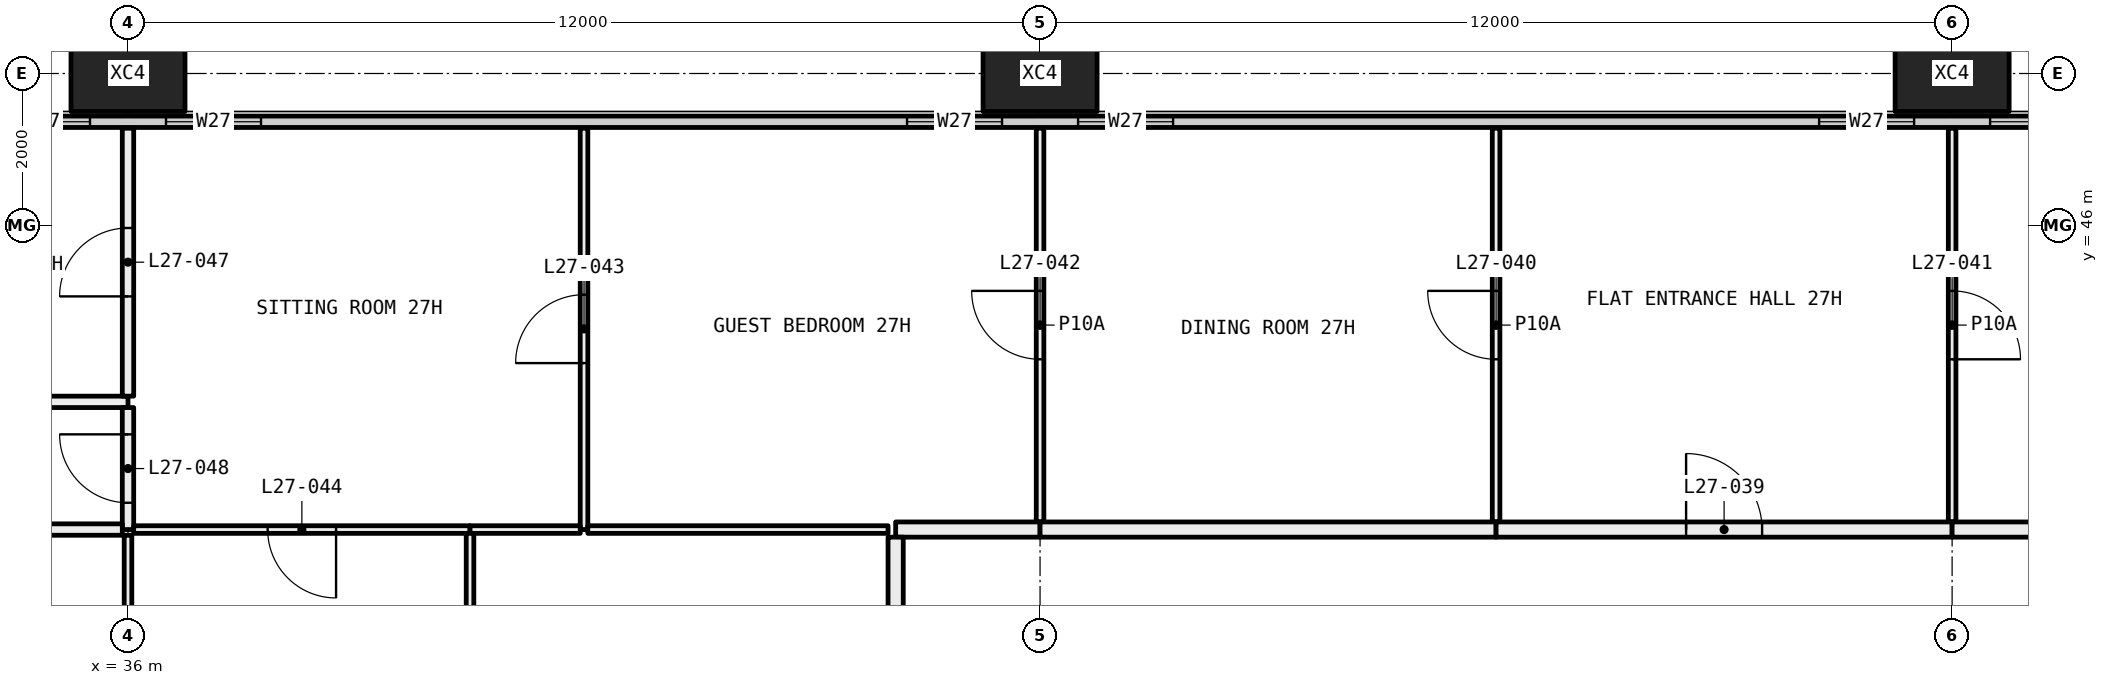
"""IFC4 building model, lengths in metres.
Left out: names, types, materials, properties, quantities, classifications, styles, units other than length and angle.
Written with IfcOpenShell. Run it as: python <this file> out.ifc"""

import sys

from ifc_helpers import new_model, si_unit, direction, frame, frame_2d, origin, origin_2d, place, context, subcontext, project, spatial, rectangle, hollow_rectangle, extrude, element, fill, save


model = new_model("IFC4")
c1 = context("Model", 3, precision=1e-05, world=origin(), true_north=direction((0.0, 1.0)))
c2 = subcontext(c1, "Body", "Model", "MODEL_VIEW")
j1 = project(units=[si_unit("LENGTHUNIT", "METRE"), si_unit("PLANEANGLEUNIT", "RADIAN")], contexts=[c1])
p1 = place(None, origin())
s1 = spatial("IfcSite", under=j1, at=p1, CompositionType="ELEMENT")
p2 = place(p1, origin())
s2 = spatial("IfcBuilding", under=s1, at=p2, CompositionType="ELEMENT")
p3 = place(p2, frame((0.0, 0.0, 106.95)))
s3 = spatial("IfcBuildingStorey", under=s2, at=p3, CompositionType="ELEMENT", Elevation=106.95)
for number, where, z_axis, x_axis in (
    (1, (36.0, 48.0, -0.4), (0.0, 0.0, 1.0), (1.0, 0.0, 0.0)),
    (2, (48.0, 48.0, -0.4), (0.0, 0.0, 1.0), (1.0, 0.0, 0.0)),
    (3, (60.0, 48.0, -0.4), (0.0, 0.0, 1.0), (1.0, 0.0, 0.0)),
):
    element("IfcColumn", number, at=place(p3, frame(where, z_axis=z_axis, x_axis=x_axis)), inside=s3, PredefinedType="COLUMN", context=c2, shape_type="SweptSolid", body=[
        extrude(hollow_rectangle(XDim=1.5, YDim=1.0, WallThickness=0.06, at=origin_2d()), origin(), (0.0, 0.0, 1.0), 3.45),
    ])
p4 = place(p3, frame((6.56, 47.365, 0.0), z_axis=(0.0, 0.0, 1.0), x_axis=(1.0, 0.0, 0.0)))
e4 = element("IfcWall", 4, at=p4, inside=s3, PredefinedType="ELEMENTEDWALL", context=c2, shape_type="SweptSolid", body=[
    extrude(rectangle(XDim=58.88, YDim=0.15, at=frame_2d((29.44, 0.0))), origin(), (0.0, 0.0, 1.0), 3.05),
])
p5 = place(p4, frame((0.44, 0.0, 0.45)))
e5 = element("IfcOpeningElement", 5, at=p5, cuts=e4, PredefinedType="OPENING", context=c2, shape_type="SweptSolid", body=[
    extrude(rectangle(XDim=4.5, YDim=2.55, at=frame_2d((2.25, 1.275))), frame((0.0, 0.085, 0.0), z_axis=(0.0, -1.0, 0.0), x_axis=(1.0, 0.0, 0.0)), (0.0, 0.0, 1.0), 0.17),
])
p6 = place(p4, frame((5.94, 0.0, 0.45)))
e6 = element("IfcOpeningElement", 6, at=p6, cuts=e4, PredefinedType="OPENING", context=c2, shape_type="SweptSolid", body=[
    extrude(rectangle(XDim=1.25, YDim=2.55, at=frame_2d((0.625, 1.275))), frame((0.0, 0.085, 0.0), z_axis=(0.0, -1.0, 0.0), x_axis=(1.0, 0.0, 0.0)), (0.0, 0.0, 1.0), 0.17),
])
p7 = place(p4, frame((15.69, 0.0, 0.45)))
e7 = element("IfcOpeningElement", 7, at=p7, cuts=e4, PredefinedType="OPENING", context=c2, shape_type="SweptSolid", body=[
    extrude(rectangle(XDim=1.25, YDim=2.55, at=frame_2d((0.625, 1.275))), frame((0.0, 0.085, 0.0), z_axis=(0.0, -1.0, 0.0), x_axis=(1.0, 0.0, 0.0)), (0.0, 0.0, 1.0), 0.17),
])
p8 = place(p4, frame((17.94, 0.0, 0.45)))
e8 = element("IfcOpeningElement", 8, at=p8, cuts=e4, PredefinedType="OPENING", context=c2, shape_type="SweptSolid", body=[
    extrude(rectangle(XDim=1.25, YDim=2.55, at=frame_2d((0.625, 1.275))), frame((0.0, 0.085, 0.0), z_axis=(0.0, -1.0, 0.0), x_axis=(1.0, 0.0, 0.0)), (0.0, 0.0, 1.0), 0.17),
])
p9 = place(p4, frame((27.69, 0.0, 0.45)))
e9 = element("IfcOpeningElement", 9, at=p9, cuts=e4, PredefinedType="OPENING", context=c2, shape_type="SweptSolid", body=[
    extrude(rectangle(XDim=1.25, YDim=2.55, at=frame_2d((0.625, 1.275))), frame((0.0, 0.085, 0.0), z_axis=(0.0, -1.0, 0.0), x_axis=(1.0, 0.0, 0.0)), (0.0, 0.0, 1.0), 0.17),
])
p10 = place(p4, frame((29.94, 0.0, 0.45)))
e10 = element("IfcOpeningElement", 10, at=p10, cuts=e4, PredefinedType="OPENING", context=c2, shape_type="SweptSolid", body=[
    extrude(rectangle(XDim=1.25, YDim=2.55, at=frame_2d((0.625, 1.275))), frame((0.0, 0.085, 0.0), z_axis=(0.0, -1.0, 0.0), x_axis=(1.0, 0.0, 0.0)), (0.0, 0.0, 1.0), 0.17),
])
p11 = place(p4, frame((39.69, 0.0, 0.45)))
e11 = element("IfcOpeningElement", 11, at=p11, cuts=e4, PredefinedType="OPENING", context=c2, shape_type="SweptSolid", body=[
    extrude(rectangle(XDim=1.25, YDim=2.55, at=frame_2d((0.625, 1.275))), frame((0.0, 0.085, 0.0), z_axis=(0.0, -1.0, 0.0), x_axis=(1.0, 0.0, 0.0)), (0.0, 0.0, 1.0), 0.17),
])
p12 = place(p4, frame((41.94, 0.0, 0.45)))
e12 = element("IfcOpeningElement", 12, at=p12, cuts=e4, PredefinedType="OPENING", context=c2, shape_type="SweptSolid", body=[
    extrude(rectangle(XDim=1.25, YDim=2.55, at=frame_2d((0.625, 1.275))), frame((0.0, 0.085, 0.0), z_axis=(0.0, -1.0, 0.0), x_axis=(1.0, 0.0, 0.0)), (0.0, 0.0, 1.0), 0.17),
])
p13 = place(p4, frame((51.69, 0.0, 0.45)))
e13 = element("IfcOpeningElement", 13, at=p13, cuts=e4, PredefinedType="OPENING", context=c2, shape_type="SweptSolid", body=[
    extrude(rectangle(XDim=1.25, YDim=2.55, at=frame_2d((0.625, 1.275))), frame((0.0, 0.085, 0.0), z_axis=(0.0, -1.0, 0.0), x_axis=(1.0, 0.0, 0.0)), (0.0, 0.0, 1.0), 0.17),
])
p14 = place(p4, frame((53.94, 0.0, 0.45)))
e14 = element("IfcOpeningElement", 14, at=p14, cuts=e4, PredefinedType="OPENING", context=c2, shape_type="SweptSolid", body=[
    extrude(rectangle(XDim=4.5, YDim=2.55, at=frame_2d((2.25, 1.275))), frame((0.0, 0.085, 0.0), z_axis=(0.0, -1.0, 0.0), x_axis=(1.0, 0.0, 0.0)), (0.0, 0.0, 1.0), 0.17),
])
p15 = place(p3, frame((30.1, 43.68, 0.0), z_axis=(0.0, 0.0, 1.0), x_axis=(1.0, 0.0, 0.0)))
e15 = element("IfcWall", 15, at=p15, inside=s3, PredefinedType="PARTITIONING", context=c2, shape_type="SweptSolid", body=[
    extrude(rectangle(XDim=5.9, YDim=0.15, at=frame_2d((2.95, 0.0))), origin(), (0.0, 0.0, 1.0), 2.45),
])
p16 = place(p3, frame((36.0, 43.755, 0.0), z_axis=(0.0, 0.0, 1.0), x_axis=(0.0, 1.0, 0.0)))
e16 = element("IfcWall", 16, at=p16, inside=s3, PredefinedType="PARTITIONING", context=c2, shape_type="SweptSolid", body=[
    extrude(rectangle(XDim=3.525, YDim=0.15, at=frame_2d((1.763, 0.0))), origin(), (0.0, 0.0, 1.0), 2.45),
])
p17 = place(p16, frame((1.312, 0.0, 0.0)))
e17 = element("IfcOpeningElement", 17, at=p17, cuts=e16, PredefinedType="OPENING", context=c2, shape_type="SweptSolid", body=[
    extrude(rectangle(XDim=0.9, YDim=2.1, at=frame_2d((0.45, 1.05))), frame((0.0, 0.085, 0.0), z_axis=(0.0, -1.0, 0.0), x_axis=(1.0, 0.0, 0.0)), (0.0, 0.0, 1.0), 0.17),
])
p18 = place(p3, frame((36.0, 42.0, 0.0), z_axis=(0.0, 0.0, 1.0), x_axis=(0.0, 1.0, 0.0)))
e18 = element("IfcWall", 18, at=p18, inside=s3, PredefinedType="PARTITIONING", context=c2, shape_type="SweptSolid", body=[
    extrude(rectangle(XDim=1.605, YDim=0.15, at=frame_2d((0.802, 0.0))), origin(), (0.0, 0.0, 1.0), 2.45),
])
p19 = place(p18, frame((0.353, 0.0, 0.0)))
e19 = element("IfcOpeningElement", 19, at=p19, cuts=e18, PredefinedType="OPENING", context=c2, shape_type="SweptSolid", body=[
    extrude(rectangle(XDim=0.9, YDim=2.1, at=frame_2d((0.45, 1.05))), frame((0.0, 0.085, 0.0), z_axis=(0.0, -1.0, 0.0), x_axis=(1.0, 0.0, 0.0)), (0.0, 0.0, 1.0), 0.17),
])
p20 = place(p3, frame((30.1, 42.0, 0.0), z_axis=(0.0, 0.0, 1.0), x_axis=(1.0, 0.0, 0.0)))
e20 = element("IfcWall", 20, at=p20, inside=s3, PredefinedType="PARTITIONING", context=c2, shape_type="SweptSolid", body=[
    extrude(rectangle(XDim=5.825, YDim=0.15, at=frame_2d((2.913, 0.0))), origin(), (0.0, 0.0, 1.0), 2.45),
])
p21 = place(p3, frame((42.0, 42.0, 0.0), z_axis=(0.0, 0.0, 1.0), x_axis=(0.0, 1.0, 0.0)))
e21 = element("IfcWall", 21, at=p21, inside=s3, PredefinedType="PARTITIONING", context=c2, shape_type="SweptSolid", body=[
    extrude(rectangle(XDim=5.28, YDim=0.1, at=frame_2d((2.64, 0.0))), origin(), (0.0, 0.0, 1.0), 3.05),
])
p22 = place(p21, frame((2.19, 0.0, 0.0)))
e22 = element("IfcOpeningElement", 22, at=p22, cuts=e21, PredefinedType="OPENING", context=c2, shape_type="SweptSolid", body=[
    extrude(rectangle(XDim=0.9, YDim=2.1, at=frame_2d((0.45, 1.05))), frame((0.0, 0.06, 0.0), z_axis=(0.0, -1.0, 0.0), x_axis=(1.0, 0.0, 0.0)), (0.0, 0.0, 1.0), 0.12),
])
p23 = place(p3, frame((36.075, 42.0, 0.0), z_axis=(0.0, 0.0, 1.0), x_axis=(1.0, 0.0, 0.0)))
e23 = element("IfcWall", 23, at=p23, inside=s3, PredefinedType="PARTITIONING", context=c2, shape_type="SweptSolid", body=[
    extrude(rectangle(XDim=4.425, YDim=0.1, at=frame_2d((2.212, 0.0))), origin(), (0.0, 0.0, 1.0), 2.45),
])
p24 = place(p23, frame((1.762, 0.0, 0.0)))
e24 = element("IfcOpeningElement", 24, at=p24, cuts=e23, PredefinedType="OPENING", context=c2, shape_type="SweptSolid", body=[
    extrude(rectangle(XDim=0.9, YDim=2.1, at=frame_2d((0.45, 1.05))), frame((0.0, 0.06, 0.0), z_axis=(0.0, -1.0, 0.0), x_axis=(1.0, 0.0, 0.0)), (0.0, 0.0, 1.0), 0.12),
])
p25 = place(p3, frame((40.5, 42.0, 0.0), z_axis=(0.0, 0.0, 1.0), x_axis=(1.0, 0.0, 0.0)))
e25 = element("IfcWall", 25, at=p25, inside=s3, PredefinedType="PARTITIONING", context=c2, shape_type="SweptSolid", body=[
    extrude(rectangle(XDim=1.45, YDim=0.1, at=frame_2d((0.725, 0.0))), origin(), (0.0, 0.0, 1.0), 3.05),
])
p26 = place(p3, frame((48.0, 42.1, 0.0), z_axis=(0.0, 0.0, 1.0), x_axis=(0.0, 1.0, 0.0)))
e26 = element("IfcWall", 26, at=p26, inside=s3, PredefinedType="PARTITIONING", context=c2, shape_type="SweptSolid", body=[
    extrude(rectangle(XDim=5.18, YDim=0.1, at=frame_2d((2.59, 0.0))), origin(), (0.0, 0.0, 1.0), 3.05),
])
p27 = place(p26, frame((2.14, 0.0, 0.0)))
e27 = element("IfcOpeningElement", 27, at=p27, cuts=e26, PredefinedType="OPENING", context=c2, shape_type="SweptSolid", body=[
    extrude(rectangle(XDim=0.9, YDim=2.1, at=frame_2d((0.45, 1.05))), frame((0.0, 0.06, 0.0), z_axis=(0.0, -1.0, 0.0), x_axis=(1.0, 0.0, 0.0)), (0.0, 0.0, 1.0), 0.12),
])
p28 = place(p3, frame((42.05, 42.0, 0.0), z_axis=(0.0, 0.0, 1.0), x_axis=(1.0, 0.0, 0.0)))
e28 = element("IfcWall", 28, at=p28, inside=s3, PredefinedType="PARTITIONING", context=c2, shape_type="SweptSolid", body=[
    extrude(rectangle(XDim=3.95, YDim=0.1, at=frame_2d((1.975, 0.0))), origin(), (0.0, 0.0, 1.0), 3.05),
])
p29 = place(p3, frame((46.1, 42.0, 0.0), z_axis=(0.0, 0.0, 1.0), x_axis=(1.0, 0.0, 0.0)))
e29 = element("IfcWall", 29, at=p29, inside=s3, PredefinedType="PARTITIONING", context=c2, shape_type="SweptSolid", body=[
    extrude(rectangle(XDim=1.9, YDim=0.2, at=frame_2d((0.95, 0.0))), origin(), (0.0, 0.0, 1.0), 3.05),
])
p30 = place(p3, frame((54.0, 42.1, 0.0), z_axis=(0.0, 0.0, 1.0), x_axis=(0.0, 1.0, 0.0)))
e30 = element("IfcWall", 30, at=p30, inside=s3, PredefinedType="PARTITIONING", context=c2, shape_type="SweptSolid", body=[
    extrude(rectangle(XDim=5.18, YDim=0.1, at=frame_2d((2.59, 0.0))), origin(), (0.0, 0.0, 1.0), 3.05),
])
p31 = place(p30, frame((2.14, 0.0, 0.0)))
e31 = element("IfcOpeningElement", 31, at=p31, cuts=e30, PredefinedType="OPENING", context=c2, shape_type="SweptSolid", body=[
    extrude(rectangle(XDim=0.9, YDim=2.1, at=frame_2d((0.45, 1.05))), frame((0.0, 0.06, 0.0), z_axis=(0.0, -1.0, 0.0), x_axis=(1.0, 0.0, 0.0)), (0.0, 0.0, 1.0), 0.12),
])
p32 = place(p3, frame((48.0, 42.0, 0.0), z_axis=(0.0, 0.0, 1.0), x_axis=(1.0, 0.0, 0.0)))
e32 = element("IfcWall", 32, at=p32, inside=s3, PredefinedType="PARTITIONING", context=c2, shape_type="SweptSolid", body=[
    extrude(rectangle(XDim=6.0, YDim=0.2, at=frame_2d((3.0, 0.0))), origin(), (0.0, 0.0, 1.0), 3.05),
])
p33 = place(p3, frame((60.0, 42.1, 0.0), z_axis=(0.0, 0.0, 1.0), x_axis=(0.0, 1.0, 0.0)))
e33 = element("IfcWall", 33, at=p33, inside=s3, PredefinedType="PARTITIONING", context=c2, shape_type="SweptSolid", body=[
    extrude(rectangle(XDim=5.18, YDim=0.1, at=frame_2d((2.59, 0.0))), origin(), (0.0, 0.0, 1.0), 3.05),
])
p34 = place(p33, frame((2.14, 0.0, 0.0)))
e34 = element("IfcOpeningElement", 34, at=p34, cuts=e33, PredefinedType="OPENING", context=c2, shape_type="SweptSolid", body=[
    extrude(rectangle(XDim=0.9, YDim=2.1, at=frame_2d((0.45, 1.05))), frame((0.0, 0.06, 0.0), z_axis=(0.0, -1.0, 0.0), x_axis=(1.0, 0.0, 0.0)), (0.0, 0.0, 1.0), 0.12),
])
p35 = place(p3, frame((54.0, 42.0, 0.0), z_axis=(0.0, 0.0, 1.0), x_axis=(1.0, 0.0, 0.0)))
e35 = element("IfcWall", 35, at=p35, inside=s3, PredefinedType="PARTITIONING", context=c2, shape_type="SweptSolid", body=[
    extrude(rectangle(XDim=6.0, YDim=0.2, at=frame_2d((3.0, 0.0))), origin(), (0.0, 0.0, 1.0), 3.05),
])
p36 = place(p35, frame((2.5, 0.0, 0.0)))
e36 = element("IfcOpeningElement", 36, at=p36, cuts=e35, PredefinedType="OPENING", context=c2, shape_type="SweptSolid", body=[
    extrude(rectangle(XDim=1.0, YDim=2.1, at=frame_2d((0.5, 1.05))), frame((0.0, 0.11, 0.0), z_axis=(0.0, -1.0, 0.0), x_axis=(1.0, 0.0, 0.0)), (0.0, 0.0, 1.0), 0.22),
])
p37 = place(p3, frame((60.0, 42.0, 0.0), z_axis=(0.0, 0.0, 1.0), x_axis=(1.0, 0.0, 0.0)))
e37 = element("IfcWall", 37, at=p37, inside=s3, PredefinedType="PARTITIONING", context=c2, shape_type="SweptSolid", body=[
    extrude(rectangle(XDim=1.8, YDim=0.2, at=frame_2d((0.9, 0.0))), origin(), (0.0, 0.0, 1.0), 3.05),
])
p38 = place(p3, frame((36.0, 36.75, 0.0), z_axis=(0.0, 0.0, 1.0), x_axis=(0.0, 1.0, 0.0)))
e38 = element("IfcWall", 38, at=p38, inside=s3, PredefinedType="PARTITIONING", context=c2, shape_type="SweptSolid", body=[
    extrude(rectangle(XDim=5.175, YDim=0.1, at=frame_2d((2.587, 0.0))), origin(), (0.0, 0.0, 1.0), 2.45),
])
p39 = place(p38, frame((2.137, 0.0, 0.0)))
e39 = element("IfcOpeningElement", 39, at=p39, cuts=e38, PredefinedType="OPENING", context=c2, shape_type="SweptSolid", body=[
    extrude(rectangle(XDim=0.9, YDim=2.1, at=frame_2d((0.45, 1.05))), frame((0.0, 0.06, 0.0), z_axis=(0.0, -1.0, 0.0), x_axis=(1.0, 0.0, 0.0)), (0.0, 0.0, 1.0), 0.12),
])
p40 = place(p3, frame((40.5, 36.1, 0.0), z_axis=(0.0, 0.0, 1.0), x_axis=(0.0, 1.0, 0.0)))
e40 = element("IfcWall", 40, at=p40, inside=s3, PredefinedType="PARTITIONING", context=c2, shape_type="SweptSolid", body=[
    extrude(rectangle(XDim=5.85, YDim=0.1, at=frame_2d((2.925, 0.0))), origin(), (0.0, 0.0, 1.0), 3.05),
])
p41 = place(p40, frame((2.475, 0.0, 0.0)))
e41 = element("IfcOpeningElement", 41, at=p41, cuts=e40, PredefinedType="OPENING", context=c2, shape_type="SweptSolid", body=[
    extrude(rectangle(XDim=0.9, YDim=2.1, at=frame_2d((0.45, 1.05))), frame((0.0, 0.06, 0.0), z_axis=(0.0, -1.0, 0.0), x_axis=(1.0, 0.0, 0.0)), (0.0, 0.0, 1.0), 0.12),
])
p42 = place(p3, frame((46.1, 36.1, 0.0), z_axis=(0.0, 0.0, 1.0), x_axis=(0.0, 1.0, 0.0)))
e42 = element("IfcWall", 42, at=p42, inside=s3, PredefinedType="PARTITIONING", context=c2, shape_type="SweptSolid", body=[
    extrude(rectangle(XDim=5.8, YDim=0.2, at=frame_2d((2.9, 0.0))), origin(), (0.0, 0.0, 1.0), 3.05),
])
p43 = place(p9, origin())
e43 = element("IfcWindow", 43, at=p43, inside=s3, PartitioningType="SINGLE_PANEL", PredefinedType="WINDOW", context=c2, shape_type="SweptSolid", body=[
    extrude(rectangle(XDim=1.25, YDim=2.55, at=frame_2d((0.625, 1.275))), frame((0.0, 0.03, 0.0), z_axis=(0.0, -1.0, 0.0), x_axis=(1.0, 0.0, 0.0)), (0.0, 0.0, 1.0), 0.06),
])
fill(e9, e43)
p44 = place(p10, origin())
e44 = element("IfcWindow", 44, at=p44, inside=s3, PartitioningType="SINGLE_PANEL", PredefinedType="WINDOW", context=c2, shape_type="SweptSolid", body=[
    extrude(rectangle(XDim=1.25, YDim=2.55, at=frame_2d((0.625, 1.275))), frame((0.0, 0.03, 0.0), z_axis=(0.0, -1.0, 0.0), x_axis=(1.0, 0.0, 0.0)), (0.0, 0.0, 1.0), 0.06),
])
fill(e10, e44)
p45 = place(p11, origin())
e45 = element("IfcWindow", 45, at=p45, inside=s3, PartitioningType="SINGLE_PANEL", PredefinedType="WINDOW", context=c2, shape_type="SweptSolid", body=[
    extrude(rectangle(XDim=1.25, YDim=2.55, at=frame_2d((0.625, 1.275))), frame((0.0, 0.03, 0.0), z_axis=(0.0, -1.0, 0.0), x_axis=(1.0, 0.0, 0.0)), (0.0, 0.0, 1.0), 0.06),
])
fill(e11, e45)
p46 = place(p12, origin())
e46 = element("IfcWindow", 46, at=p46, inside=s3, PartitioningType="SINGLE_PANEL", PredefinedType="WINDOW", context=c2, shape_type="SweptSolid", body=[
    extrude(rectangle(XDim=1.25, YDim=2.55, at=frame_2d((0.625, 1.275))), frame((0.0, 0.03, 0.0), z_axis=(0.0, -1.0, 0.0), x_axis=(1.0, 0.0, 0.0)), (0.0, 0.0, 1.0), 0.06),
])
fill(e12, e46)
p47 = place(p13, origin())
e47 = element("IfcWindow", 47, at=p47, inside=s3, PartitioningType="SINGLE_PANEL", PredefinedType="WINDOW", context=c2, shape_type="SweptSolid", body=[
    extrude(rectangle(XDim=1.25, YDim=2.55, at=frame_2d((0.625, 1.275))), frame((0.0, 0.03, 0.0), z_axis=(0.0, -1.0, 0.0), x_axis=(1.0, 0.0, 0.0)), (0.0, 0.0, 1.0), 0.06),
])
fill(e13, e47)
p48 = place(p14, origin())
e48 = element("IfcWindow", 48, at=p48, inside=s3, PartitioningType="SINGLE_PANEL", PredefinedType="WINDOW", context=c2, shape_type="SweptSolid", body=[
    extrude(rectangle(XDim=4.5, YDim=2.55, at=frame_2d((2.25, 1.275))), frame((0.0, 0.03, 0.0), z_axis=(0.0, -1.0, 0.0), x_axis=(1.0, 0.0, 0.0)), (0.0, 0.0, 1.0), 0.06),
])
fill(e14, e48)
p49 = place(p36, origin())
e49 = element("IfcDoor", 49, at=p49, inside=s3, OperationType="SINGLE_SWING_RIGHT", PredefinedType="DOOR", context=c2, shape_type="SweptSolid", body=[
    extrude(rectangle(XDim=1.0, YDim=2.1, at=frame_2d((0.5, 1.05))), frame((0.0, 0.025, 0.0), z_axis=(0.0, -1.0, 0.0), x_axis=(1.0, 0.0, 0.0)), (0.0, 0.0, 1.0), 0.05),
])
fill(e36, e49)
p50 = place(p31, origin())
e50 = element("IfcDoor", 50, at=p50, inside=s3, OperationType="SINGLE_SWING_LEFT", PredefinedType="DOOR", context=c2, shape_type="SweptSolid", body=[
    extrude(rectangle(XDim=0.9, YDim=2.1, at=frame_2d((0.45, 1.05))), frame((0.0, 0.025, 0.0), z_axis=(0.0, -1.0, 0.0), x_axis=(1.0, 0.0, 0.0)), (0.0, 0.0, 1.0), 0.05),
])
fill(e31, e50)
p51 = place(p34, frame((0.9, 0.0, 0.0), x_axis=(-1.0, 0.0, 0.0)))
e51 = element("IfcDoor", 51, at=p51, inside=s3, OperationType="SINGLE_SWING_LEFT", PredefinedType="DOOR", context=c2, shape_type="SweptSolid", body=[
    extrude(rectangle(XDim=0.9, YDim=2.1, at=frame_2d((0.45, 1.05))), frame((0.0, 0.025, 0.0), z_axis=(0.0, -1.0, 0.0), x_axis=(1.0, 0.0, 0.0)), (0.0, 0.0, 1.0), 0.05),
])
fill(e34, e51)
p52 = place(p27, origin())
e52 = element("IfcDoor", 52, at=p52, inside=s3, OperationType="SINGLE_SWING_LEFT", PredefinedType="DOOR", context=c2, shape_type="SweptSolid", body=[
    extrude(rectangle(XDim=0.9, YDim=2.1, at=frame_2d((0.45, 1.05))), frame((0.0, 0.025, 0.0), z_axis=(0.0, -1.0, 0.0), x_axis=(1.0, 0.0, 0.0)), (0.0, 0.0, 1.0), 0.05),
])
fill(e27, e52)
p53 = place(p22, origin())
e53 = element("IfcDoor", 53, at=p53, inside=s3, OperationType="SINGLE_SWING_RIGHT", PredefinedType="DOOR", context=c2, shape_type="SweptSolid", body=[
    extrude(rectangle(XDim=0.9, YDim=2.1, at=frame_2d((0.45, 1.05))), frame((0.0, 0.025, 0.0), z_axis=(0.0, -1.0, 0.0), x_axis=(1.0, 0.0, 0.0)), (0.0, 0.0, 1.0), 0.05),
])
fill(e22, e53)
p54 = place(p24, frame((0.9, 0.0, 0.0), x_axis=(-1.0, 0.0, 0.0)))
e54 = element("IfcDoor", 54, at=p54, inside=s3, OperationType="SINGLE_SWING_RIGHT", PredefinedType="DOOR", context=c2, shape_type="SweptSolid", body=[
    extrude(rectangle(XDim=0.9, YDim=2.1, at=frame_2d((0.45, 1.05))), frame((0.0, 0.025, 0.0), z_axis=(0.0, -1.0, 0.0), x_axis=(1.0, 0.0, 0.0)), (0.0, 0.0, 1.0), 0.05),
])
fill(e24, e54)
p55 = place(p17, origin())
e55 = element("IfcDoor", 55, at=p55, inside=s3, OperationType="SINGLE_SWING_RIGHT", PredefinedType="DOOR", context=c2, shape_type="SweptSolid", body=[
    extrude(rectangle(XDim=0.9, YDim=2.1, at=frame_2d((0.45, 1.05))), frame((0.0, 0.025, 0.0), z_axis=(0.0, -1.0, 0.0), x_axis=(1.0, 0.0, 0.0)), (0.0, 0.0, 1.0), 0.05),
])
fill(e17, e55)
p56 = place(p19, origin())
e56 = element("IfcDoor", 56, at=p56, inside=s3, OperationType="SINGLE_SWING_LEFT", PredefinedType="DOOR", context=c2, shape_type="SweptSolid", body=[
    extrude(rectangle(XDim=0.9, YDim=2.1, at=frame_2d((0.45, 1.05))), frame((0.0, 0.025, 0.0), z_axis=(0.0, -1.0, 0.0), x_axis=(1.0, 0.0, 0.0)), (0.0, 0.0, 1.0), 0.05),
])
fill(e19, e56)
save(model, sys.argv[1])
